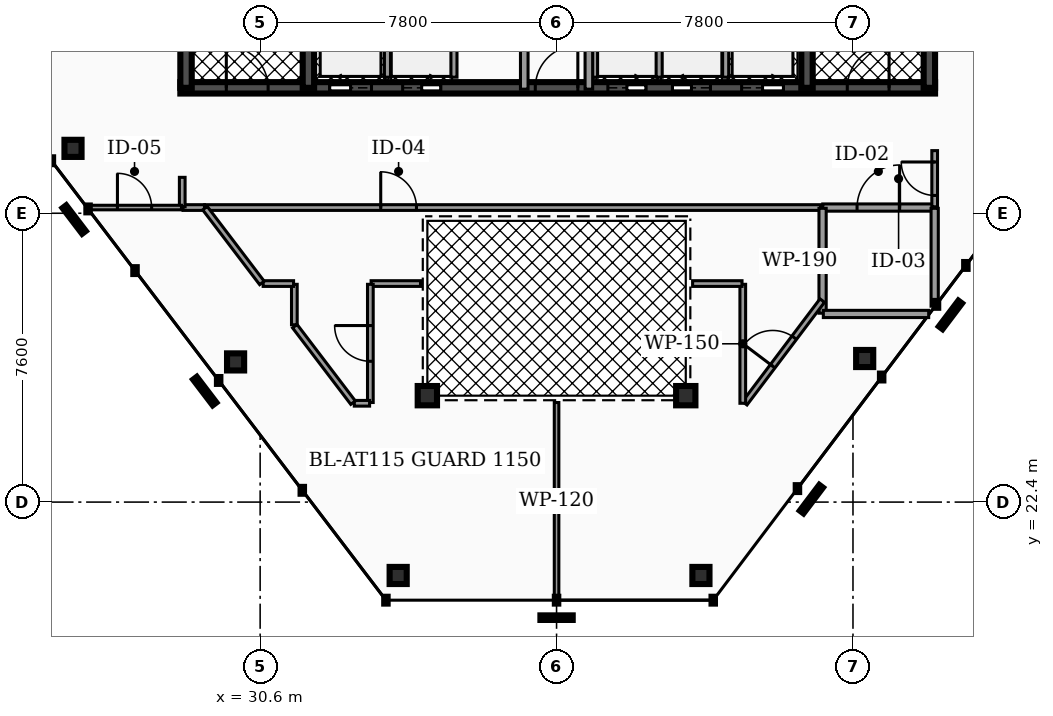
"""IFC4 building model, lengths in metres.
Left out: names, types, materials, properties, quantities, classifications, styles, units other than length and angle.
Written with IfcOpenShell. Run it as: python <this file> out.ifc"""

import sys

from ifc_helpers import new_model, si_unit, direction, frame, frame_2d, origin, origin_2d, place, context, subcontext, project, spatial, rectangle, hollow_rectangle, hollow_circle, extrude, element, fill, save


model = new_model("IFC4")
c1 = context("Model", 3, precision=1e-05, world=origin(), true_north=direction((0.0, 1.0)))
c2 = subcontext(c1, "Body", "Model", "MODEL_VIEW")
j1 = project(units=[si_unit("LENGTHUNIT", "METRE"), si_unit("PLANEANGLEUNIT", "RADIAN")], contexts=[c1])
p1 = place(None, origin())
s1 = spatial("IfcSite", under=j1, at=p1, CompositionType="ELEMENT")
p2 = place(p1, origin())
s2 = spatial("IfcBuilding", under=s1, at=p2, CompositionType="ELEMENT")
p3 = place(p2, frame((0.0, 0.0, 282.2)))
s3 = spatial("IfcBuildingStorey", under=s2, at=p3, CompositionType="ELEMENT", Elevation=282.2)
p4 = place(p3, frame((28.5, 33.3, 0.0), z_axis=(0.0, 0.0, 1.0), x_axis=(1.0, 0.0, 0.0)))
e1 = element("IfcWall", 1, at=p4, inside=s3, PredefinedType="SHEAR", context=c2, shape_type="SweptSolid", body=[
    extrude(rectangle(XDim=19.86, YDim=0.3, at=frame_2d((9.93, 0.0))), origin(), (0.0, 0.0, 1.0), 3.18),
])
p5 = place(p4, frame((3.93, 0.0, 0.0)))
e2 = element("IfcOpeningElement", 2, at=p5, cuts=e1, PredefinedType="OPENING", context=c2, shape_type="SweptSolid", body=[
    extrude(rectangle(XDim=1.1, YDim=2.15, at=frame_2d((0.55, 1.075))), frame((0.0, 0.16, 0.0), z_axis=(0.0, -1.0, 0.0), x_axis=(1.0, 0.0, 0.0)), (0.0, 0.0, 1.0), 0.32),
])
p6 = place(p4, frame((14.77, 0.0, 0.0)))
e3 = element("IfcOpeningElement", 3, at=p6, cuts=e1, PredefinedType="OPENING", context=c2, shape_type="SweptSolid", body=[
    extrude(rectangle(XDim=1.1, YDim=2.15, at=frame_2d((0.55, 1.075))), frame((0.0, 0.16, 0.0), z_axis=(0.0, -1.0, 0.0), x_axis=(1.0, 0.0, 0.0)), (0.0, 0.0, 1.0), 0.32),
])
p7 = place(p4, frame((11.25, 0.0, 0.0)))
e4 = element("IfcOpeningElement", 4, at=p7, cuts=e1, PredefinedType="OPENING", context=c2, shape_type="SweptSolid", body=[
    extrude(rectangle(XDim=1.0, YDim=2.1, at=frame_2d((0.5, 1.05))), frame((0.0, 0.16, 0.0), z_axis=(0.0, -1.0, 0.0), x_axis=(1.0, 0.0, 0.0)), (0.0, 0.0, 1.0), 0.32),
])
p8 = place(p4, frame((12.95, 0.0, 0.0)))
e5 = element("IfcOpeningElement", 5, at=p8, cuts=e1, PredefinedType="OPENING", context=c2, shape_type="SweptSolid", body=[
    extrude(rectangle(XDim=1.0, YDim=2.1, at=frame_2d((0.5, 1.05))), frame((0.0, 0.16, 0.0), z_axis=(0.0, -1.0, 0.0), x_axis=(1.0, 0.0, 0.0)), (0.0, 0.0, 1.0), 0.32),
])
p9 = place(p4, frame((5.85, 0.0, 0.0)))
e6 = element("IfcOpeningElement", 6, at=p9, cuts=e1, PredefinedType="OPENING", context=c2, shape_type="SweptSolid", body=[
    extrude(rectangle(XDim=1.0, YDim=2.1, at=frame_2d((0.5, 1.05))), frame((0.0, 0.16, 0.0), z_axis=(0.0, -1.0, 0.0), x_axis=(1.0, 0.0, 0.0)), (0.0, 0.0, 1.0), 0.32),
])
p10 = place(p4, frame((1.21, 0.0, 0.0)))
e7 = element("IfcOpeningElement", 7, at=p10, cuts=e1, PredefinedType="OPENING", context=c2, shape_type="SweptSolid", body=[
    extrude(rectangle(XDim=1.1, YDim=2.2, at=frame_2d((0.55, 1.1))), frame((0.0, 0.16, 0.0), z_axis=(0.0, -1.0, 0.0), x_axis=(1.0, 0.0, 0.0)), (0.0, 0.0, 1.0), 0.32),
])
p11 = place(p4, frame((9.34, 0.0, 0.0)))
e8 = element("IfcOpeningElement", 8, at=p11, cuts=e1, PredefinedType="OPENING", context=c2, shape_type="SweptSolid", body=[
    extrude(rectangle(XDim=1.12, YDim=2.05, at=frame_2d((0.56, 1.025))), frame((0.0, 0.16, 0.0), z_axis=(0.0, -1.0, 0.0), x_axis=(1.0, 0.0, 0.0)), (0.0, 0.0, 1.0), 0.32),
])
p12 = place(p4, frame((17.55, 0.0, 0.0)))
e9 = element("IfcOpeningElement", 9, at=p12, cuts=e1, PredefinedType="OPENING", context=c2, shape_type="SweptSolid", body=[
    extrude(rectangle(XDim=1.1, YDim=2.2, at=frame_2d((0.55, 1.1))), frame((0.0, 0.16, 0.0), z_axis=(0.0, -1.0, 0.0), x_axis=(1.0, 0.0, 0.0)), (0.0, 0.0, 1.0), 0.32),
])
for number, where, z_axis, x_axis in (
    (10, (28.65, 33.3, 0.0), (0.0, 0.0, 1.0), (0.0, 1.0, 0.0)),
    (11, (31.87, 33.3, 0.0), (0.0, 0.0, 1.0), (0.0, 1.0, 0.0)),
    (12, (44.99, 33.3, 0.0), (0.0, 0.0, 1.0), (0.0, 1.0, 0.0)),
    (13, (48.21, 33.3, 0.0), (0.0, 0.0, 1.0), (0.0, 1.0, 0.0)),
):
    element("IfcWall", number, at=place(p3, frame(where, z_axis=z_axis, x_axis=x_axis)), inside=s3, PredefinedType="SHEAR", context=c2, shape_type="SweptSolid", body=[
        extrude(rectangle(XDim=10.1, YDim=0.3, at=frame_2d((5.05, 0.0))), origin(), (0.0, 0.0, 1.0), 3.18),
    ])
for number, where, z_axis, x_axis in (
    (14, (25.676, 31.708, 0.0), (0.0, 0.0, 1.0), (1.0, 0.0, 0.0)),
    (15, (29.954, 26.088, 0.0), (0.0, 0.0, 1.0), (1.0, 0.0, 0.0)),
    (16, (34.232, 20.469, 0.0), (0.0, 0.0, 1.0), (1.0, 0.0, 0.0)),
    (17, (42.199, 20.469, 0.0), (0.0, 0.0, 1.0), (1.0, 0.0, 0.0)),
    (18, (46.508, 26.178, 0.0), (0.0, 0.0, 1.0), (1.0, 0.0, 0.0)),
):
    element("IfcColumn", number, at=place(p3, frame(where, z_axis=z_axis, x_axis=x_axis)), inside=s3, PredefinedType="COLUMN", context=c2, shape_type="SweptSolid", body=[
        extrude(hollow_rectangle(XDim=0.45, YDim=0.45, WallThickness=0.022, at=origin_2d()), origin(), (0.0, 0.0, 1.0), 3.18),
    ])
for number, where, z_axis, x_axis in (
    (19, (35.0, 25.2, 0.0), (0.0, 0.0, 1.0), (1.0, 0.0, 0.0)),
    (20, (41.8, 25.2, 0.0), (0.0, 0.0, 1.0), (1.0, 0.0, 0.0)),
):
    element("IfcColumn", number, at=place(p3, frame(where, z_axis=z_axis, x_axis=x_axis)), inside=s3, PredefinedType="COLUMN", context=c2, shape_type="SweptSolid", body=[
        extrude(hollow_circle(Radius=0.254, WallThickness=0.02, at=origin_2d()), origin(), (0.0, 0.0, 1.0), 3.18),
    ])
for number, where, z_axis, x_axis in (
    (21, (33.95, 33.58, 0.0), (0.0, 0.0, 1.0), (0.0, 1.0, 0.0)),
    (22, (42.85, 33.58, 0.0), (0.0, 0.0, 1.0), (0.0, 1.0, 0.0)),
):
    element("IfcWall", number, at=place(p3, frame(where, z_axis=z_axis, x_axis=x_axis)), inside=s3, PredefinedType="SOLIDWALL", context=c2, shape_type="SweptSolid", body=[
        extrude(rectangle(XDim=2.45, YDim=0.16, at=frame_2d((1.225, 0.0))), origin(), (0.0, 0.0, 1.0), 3.18),
    ])
for number, where, z_axis, x_axis in (
    (23, (39.4, 33.58, 0.0), (0.0, 0.0, 1.0), (0.0, 1.0, 0.0)),
    (24, (41.1, 33.58, 0.0), (0.0, 0.0, 1.0), (0.0, 1.0, 0.0)),
    (25, (35.7, 33.58, 0.0), (0.0, 0.0, 1.0), (0.0, 1.0, 0.0)),
):
    element("IfcWall", number, at=place(p3, frame(where, z_axis=z_axis, x_axis=x_axis)), inside=s3, PredefinedType="SOLIDWALL", context=c2, shape_type="SweptSolid", body=[
        extrude(rectangle(XDim=2.25, YDim=0.16, at=frame_2d((1.125, 0.0))), origin(), (0.0, 0.0, 1.0), 3.18),
    ])
p13 = place(p3, frame((37.55, 33.265, 0.0), z_axis=(0.0, 0.0, 1.0), x_axis=(0.0, 1.0, 0.0)))
e26 = element("IfcWall", 26, at=p13, inside=s3, PredefinedType="PARTITIONING", context=c2, shape_type="SweptSolid", body=[
    extrude(rectangle(XDim=4.595, YDim=0.2, at=frame_2d((2.298, 0.0))), origin(), (0.0, 0.0, 1.0), 2.235),
])
p14 = place(p13, frame((1.857, 0.0, 0.0)))
e27 = element("IfcOpeningElement", 27, at=p14, cuts=e26, PredefinedType="OPENING", context=c2, shape_type="SweptSolid", body=[
    extrude(rectangle(XDim=0.88, YDim=2.05, at=frame_2d((0.44, 1.025))), frame((0.0, 0.11, 0.0), z_axis=(0.0, -1.0, 0.0), x_axis=(1.0, 0.0, 0.0)), (0.0, 0.0, 1.0), 0.22),
])
p15 = place(p3, frame((39.25, 33.265, 0.0), z_axis=(0.0, 0.0, 1.0), x_axis=(0.0, 1.0, 0.0)))
e28 = element("IfcWall", 28, at=p15, inside=s3, PredefinedType="PARTITIONING", context=c2, shape_type="SweptSolid", body=[
    extrude(rectangle(XDim=4.595, YDim=0.2, at=frame_2d((2.298, 0.0))), origin(), (0.0, 0.0, 1.0), 2.235),
])
p16 = place(p15, frame((3.058, 0.0, 0.0)))
e29 = element("IfcOpeningElement", 29, at=p16, cuts=e28, PredefinedType="OPENING", context=c2, shape_type="SweptSolid", body=[
    extrude(rectangle(XDim=0.88, YDim=2.05, at=frame_2d((0.44, 1.025))), frame((0.0, 0.11, 0.0), z_axis=(0.0, -1.0, 0.0), x_axis=(1.0, 0.0, 0.0)), (0.0, 0.0, 1.0), 0.22),
])
p17 = place(p3, frame((45.405, 30.15, 0.0), z_axis=(0.0, 0.0, 1.0), x_axis=(1.0, 0.0, 0.0)))
e30 = element("IfcWall", 30, at=p17, inside=s3, PredefinedType="PARTITIONING", context=c2, shape_type="SweptSolid", body=[
    extrude(rectangle(XDim=2.925, YDim=0.19, at=frame_2d((1.462, 0.0))), origin(), (0.0, 0.0, 1.0), 2.235),
])
p18 = place(p17, frame((0.903, 0.0, 0.0)))
e31 = element("IfcOpeningElement", 31, at=p18, cuts=e30, PredefinedType="OPENING", context=c2, shape_type="SweptSolid", body=[
    extrude(rectangle(XDim=1.12, YDim=2.05, at=frame_2d((0.56, 1.025))), frame((0.0, 0.105, 0.0), z_axis=(0.0, -1.0, 0.0), x_axis=(1.0, 0.0, 0.0)), (0.0, 0.0, 1.0), 0.21),
])
p19 = place(p3, frame((29.141, 30.15, 0.0), z_axis=(0.0, 0.0, 1.0), x_axis=(1.0, 0.0, 0.0)))
e32 = element("IfcWall", 32, at=p19, inside=s3, PredefinedType="PARTITIONING", context=c2, shape_type="SweptSolid", body=[
    extrude(rectangle(XDim=16.204, YDim=0.15, at=frame_2d((8.102, 0.0))), origin(), (0.0, 0.0, 1.0), 2.235),
])
p20 = place(p19, frame((4.632, 0.0, 0.0)))
e33 = element("IfcOpeningElement", 33, at=p20, cuts=e32, PredefinedType="OPENING", context=c2, shape_type="SweptSolid", body=[
    extrude(rectangle(XDim=0.94, YDim=2.05, at=frame_2d((0.47, 1.025))), frame((0.0, 0.085, 0.0), z_axis=(0.0, -1.0, 0.0), x_axis=(1.0, 0.0, 0.0)), (0.0, 0.0, 1.0), 0.17),
])
p21 = place(p3, frame((28.57, 30.15, 0.0), z_axis=(0.0, 0.0, 1.0), x_axis=(1.0, 0.0, 0.0)))
e34 = element("IfcWall", 34, at=p21, inside=s3, PredefinedType="PARTITIONING", context=c2, shape_type="SweptSolid", body=[
    extrude(rectangle(XDim=0.565, YDim=0.15, at=frame_2d((0.282, 0.0))), origin(), (0.0, 0.0, 1.0), 2.235),
])
p22 = place(p3, frame((48.35, 30.17, 0.0), z_axis=(0.0, 0.0, 1.0), x_axis=(0.0, 1.0, 0.0)))
e35 = element("IfcWall", 35, at=p22, inside=s3, PredefinedType="PARTITIONING", context=c2, shape_type="SweptSolid", body=[
    extrude(rectangle(XDim=1.478, YDim=0.15, at=frame_2d((0.739, 0.0))), origin(), (0.0, 0.0, 1.0), 2.235),
])
p23 = place(p22, frame((0.299, 0.0, 0.0)))
e36 = element("IfcOpeningElement", 36, at=p23, cuts=e35, PredefinedType="OPENING", context=c2, shape_type="SweptSolid", body=[
    extrude(rectangle(XDim=0.88, YDim=2.05, at=frame_2d((0.44, 1.025))), frame((0.0, 0.085, 0.0), z_axis=(0.0, -1.0, 0.0), x_axis=(1.0, 0.0, 0.0)), (0.0, 0.0, 1.0), 0.17),
])
p24 = place(p3, frame((28.55, 30.17, 0.0), z_axis=(0.0, 0.0, 1.0), x_axis=(0.0, 1.0, 0.0)))
e37 = element("IfcWall", 37, at=p24, inside=s3, PredefinedType="PARTITIONING", context=c2, shape_type="SweptSolid", body=[
    extrude(rectangle(XDim=0.775, YDim=0.15, at=frame_2d((0.387, 0.0))), origin(), (0.0, 0.0, 1.0), 2.235),
])
p25 = place(p3, frame((45.4, 27.37, 0.0), z_axis=(0.0, 0.0, 1.0), x_axis=(0.0, 1.0, 0.0)))
e38 = element("IfcWall", 38, at=p25, inside=s3, PredefinedType="PARTITIONING", context=c2, shape_type="SweptSolid", body=[
    extrude(rectangle(XDim=2.76, YDim=0.19, at=frame_2d((1.38, 0.0))), origin(), (0.0, 0.0, 1.0), 2.235),
])
p26 = place(p3, frame((45.42, 27.35, 0.0), z_axis=(0.0, 0.0, 1.0), x_axis=(1.0, 0.0, 0.0)))
e39 = element("IfcWall", 39, at=p26, inside=s3, PredefinedType="PARTITIONING", context=c2, shape_type="SweptSolid", body=[
    extrude(rectangle(XDim=2.772, YDim=0.19, at=frame_2d((1.386, 0.0))), origin(), (0.0, 0.0, 1.0), 2.235),
])
p27 = place(p3, frame((48.35, 27.554, 0.0), z_axis=(0.0, 0.0, 1.0), x_axis=(0.0, 1.0, 0.0)))
e40 = element("IfcWall", 40, at=p27, inside=s3, PredefinedType="PARTITIONING", context=c2, shape_type="SweptSolid", body=[
    extrude(rectangle(XDim=2.575, YDim=0.19, at=frame_2d((1.288, 0.0))), origin(), (0.0, 0.0, 1.0), 2.235),
])
p28 = place(p3, frame((43.351, 25.0, 0.0), z_axis=(0.0, 0.0, 1.0), x_axis=(0.602454578258, 0.798153168969, 0.0)))
e41 = element("IfcWall", 41, at=p28, inside=s3, PredefinedType="PARTITIONING", context=c2, shape_type="SweptSolid", body=[
    extrude(rectangle(XDim=3.386, YDim=0.15, at=frame_2d((1.693, 0.0))), origin(), (0.0, 0.0, 1.0), 2.235),
])
p29 = place(p28, frame((1.223, 0.0, 0.0)))
e42 = element("IfcOpeningElement", 42, at=p29, cuts=e41, PredefinedType="OPENING", context=c2, shape_type="SweptSolid", body=[
    extrude(rectangle(XDim=0.94, YDim=2.05, at=frame_2d((0.47, 1.025))), frame((0.0, 0.085, 0.0), z_axis=(0.0, -1.0, 0.0), x_axis=(1.0, 0.0, 0.0)), (0.0, 0.0, 1.0), 0.17),
])
p30 = place(p3, frame((43.3, 25.0, 0.0), z_axis=(0.0, 0.0, 1.0), x_axis=(0.0, 1.0, 0.0)))
e43 = element("IfcWall", 43, at=p30, inside=s3, PredefinedType="PARTITIONING", context=c2, shape_type="SweptSolid", body=[
    extrude(rectangle(XDim=3.13, YDim=0.15, at=frame_2d((1.565, 0.0))), origin(), (0.0, 0.0, 1.0), 2.235),
])
for number, where, z_axis, x_axis in (
    (44, (41.98, 28.15, 0.0), (0.0, 0.0, 1.0), (1.0, 0.0, 0.0)),
    (45, (33.52, 28.15, 0.0), (0.0, 0.0, 1.0), (1.0, 0.0, 0.0)),
):
    element("IfcWall", number, at=place(p3, frame(where, z_axis=z_axis, x_axis=x_axis)), inside=s3, PredefinedType="PARTITIONING", context=c2, shape_type="SweptSolid", body=[
        extrude(rectangle(XDim=1.3, YDim=0.15, at=frame_2d((0.65, 0.0))), origin(), (0.0, 0.0, 1.0), 2.235),
    ])
p31 = place(p3, frame((33.5, 25.02, 0.0), z_axis=(0.0, 0.0, 1.0), x_axis=(0.0, 1.0, 0.0)))
e46 = element("IfcWall", 46, at=p31, inside=s3, PredefinedType="PARTITIONING", context=c2, shape_type="SweptSolid", body=[
    extrude(rectangle(XDim=3.11, YDim=0.15, at=frame_2d((1.555, 0.0))), origin(), (0.0, 0.0, 1.0), 2.235),
])
p32 = place(p31, frame((1.085, 0.0, 0.0)))
e47 = element("IfcOpeningElement", 47, at=p32, cuts=e46, PredefinedType="OPENING", context=c2, shape_type="SweptSolid", body=[
    extrude(rectangle(XDim=0.94, YDim=2.05, at=frame_2d((0.47, 1.025))), frame((0.0, 0.085, 0.0), z_axis=(0.0, -1.0, 0.0), x_axis=(1.0, 0.0, 0.0)), (0.0, 0.0, 1.0), 0.17),
])
p33 = place(p3, frame((33.077, 25.0, 0.0), z_axis=(0.0, 0.0, 1.0), x_axis=(1.0, 0.0, 0.0)))
e48 = element("IfcWall", 48, at=p33, inside=s3, PredefinedType="PARTITIONING", context=c2, shape_type="SweptSolid", body=[
    extrude(rectangle(XDim=0.403, YDim=0.15, at=frame_2d((0.201, 0.0))), origin(), (0.0, 0.0, 1.0), 2.235),
])
p34 = place(p3, frame((31.512, 27.029, 0.0), z_axis=(0.0, 0.0, 1.0), x_axis=(0.60577285366, -0.795637637225, 0.0)))
e49 = element("IfcWall", 49, at=p34, inside=s3, PredefinedType="PARTITIONING", context=c2, shape_type="SweptSolid", body=[
    extrude(rectangle(XDim=2.531, YDim=0.15, at=frame_2d((1.265, 0.0))), origin(), (0.0, 0.0, 1.0), 2.235),
])
p35 = place(p3, frame((31.5, 27.065, 0.0), z_axis=(0.0, 0.0, 1.0), x_axis=(0.0, 1.0, 0.0)))
e50 = element("IfcWall", 50, at=p35, inside=s3, PredefinedType="PARTITIONING", context=c2, shape_type="SweptSolid", body=[
    extrude(rectangle(XDim=1.065, YDim=0.15, at=frame_2d((0.532, 0.0))), origin(), (0.0, 0.0, 1.0), 2.235),
])
p36 = place(p3, frame((30.679, 28.15, 0.0), z_axis=(0.0, 0.0, 1.0), x_axis=(1.0, 0.0, 0.0)))
e51 = element("IfcWall", 51, at=p36, inside=s3, PredefinedType="PARTITIONING", context=c2, shape_type="SweptSolid", body=[
    extrude(rectangle(XDim=0.801, YDim=0.15, at=frame_2d((0.4, 0.0))), origin(), (0.0, 0.0, 1.0), 2.235),
])
p37 = place(p3, frame((29.148, 30.134, 0.0), z_axis=(0.0, 0.0, 1.0), x_axis=(0.605873710815, -0.795560837739, 0.0)))
e52 = element("IfcWall", 52, at=p37, inside=s3, PredefinedType="PARTITIONING", context=c2, shape_type="SweptSolid", body=[
    extrude(rectangle(XDim=2.474, YDim=0.15, at=frame_2d((1.237, 0.0))), origin(), (0.0, 0.0, 1.0), 2.235),
])
p38 = place(p3, frame((38.4, 19.834, 0.0), z_axis=(0.0, 0.0, 1.0), x_axis=(0.0, 1.0, 0.0)))
e53 = element("IfcWall", 53, at=p38, inside=s3, PredefinedType="PARTITIONING", context=c2, shape_type="SweptSolid", body=[
    extrude(rectangle(XDim=5.186, YDim=0.12, at=frame_2d((2.593, 0.0))), origin(), (0.0, 0.0, 1.0), 2.235),
])
p39 = place(p3, frame((26.059, 30.15, 0.0), z_axis=(0.0, 0.0, 1.0), x_axis=(1.0, 0.0, 0.0)))
e54 = element("IfcWall", 54, at=p39, inside=s3, PredefinedType="PARTITIONING", context=c2, shape_type="SweptSolid", body=[
    extrude(rectangle(XDim=2.471, YDim=0.12, at=frame_2d((1.235, 0.0))), origin(), (0.0, 0.0, 1.0), 2.235),
])
p40 = place(p39, frame((0.785, 0.0, 0.0)))
e55 = element("IfcOpeningElement", 55, at=p40, cuts=e54, PredefinedType="OPENING", context=c2, shape_type="SweptSolid", body=[
    extrude(rectangle(XDim=0.9, YDim=2.05, at=frame_2d((0.45, 1.025))), frame((0.0, 0.07, 0.0), z_axis=(0.0, -1.0, 0.0), x_axis=(1.0, 0.0, 0.0)), (0.0, 0.0, 1.0), 0.14),
])
p41 = place(p5, origin())
e56 = element("IfcDoor", 56, at=p41, inside=s3, OperationType="SLIDING_TO_LEFT", PredefinedType="DOOR", context=c2, shape_type="SweptSolid", body=[
    extrude(rectangle(XDim=1.1, YDim=2.15, at=frame_2d((0.55, 1.075))), frame((0.0, 0.025, 0.0), z_axis=(0.0, -1.0, 0.0), x_axis=(1.0, 0.0, 0.0)), (0.0, 0.0, 1.0), 0.05),
])
fill(e2, e56)
p42 = place(p6, origin())
e57 = element("IfcDoor", 57, at=p42, inside=s3, OperationType="SLIDING_TO_RIGHT", PredefinedType="DOOR", context=c2, shape_type="SweptSolid", body=[
    extrude(rectangle(XDim=1.1, YDim=2.15, at=frame_2d((0.55, 1.075))), frame((0.0, 0.025, 0.0), z_axis=(0.0, -1.0, 0.0), x_axis=(1.0, 0.0, 0.0)), (0.0, 0.0, 1.0), 0.05),
])
fill(e3, e57)
p43 = place(p7, origin())
e58 = element("IfcDoor", 58, at=p43, inside=s3, OperationType="SLIDING_TO_RIGHT", PredefinedType="DOOR", context=c2, shape_type="SweptSolid", body=[
    extrude(rectangle(XDim=1.0, YDim=2.1, at=frame_2d((0.5, 1.05))), frame((0.0, 0.025, 0.0), z_axis=(0.0, -1.0, 0.0), x_axis=(1.0, 0.0, 0.0)), (0.0, 0.0, 1.0), 0.05),
])
fill(e4, e58)
p44 = place(p8, origin())
e59 = element("IfcDoor", 59, at=p44, inside=s3, OperationType="SLIDING_TO_LEFT", PredefinedType="DOOR", context=c2, shape_type="SweptSolid", body=[
    extrude(rectangle(XDim=1.0, YDim=2.1, at=frame_2d((0.5, 1.05))), frame((0.0, 0.025, 0.0), z_axis=(0.0, -1.0, 0.0), x_axis=(1.0, 0.0, 0.0)), (0.0, 0.0, 1.0), 0.05),
])
fill(e5, e59)
p45 = place(p9, origin())
e60 = element("IfcDoor", 60, at=p45, inside=s3, OperationType="SLIDING_TO_RIGHT", PredefinedType="DOOR", context=c2, shape_type="SweptSolid", body=[
    extrude(rectangle(XDim=1.0, YDim=2.1, at=frame_2d((0.5, 1.05))), frame((0.0, 0.025, 0.0), z_axis=(0.0, -1.0, 0.0), x_axis=(1.0, 0.0, 0.0)), (0.0, 0.0, 1.0), 0.05),
])
fill(e6, e60)
p46 = place(p10, origin())
e61 = element("IfcDoor", 61, at=p46, inside=s3, OperationType="SINGLE_SWING_LEFT", PredefinedType="DOOR", context=c2, shape_type="SweptSolid", body=[
    extrude(rectangle(XDim=1.1, YDim=2.2, at=frame_2d((0.55, 1.1))), frame((0.0, 0.025, 0.0), z_axis=(0.0, -1.0, 0.0), x_axis=(1.0, 0.0, 0.0)), (0.0, 0.0, 1.0), 0.05),
])
fill(e7, e61)
p47 = place(p11, origin())
e62 = element("IfcDoor", 62, at=p47, inside=s3, OperationType="SINGLE_SWING_RIGHT", PredefinedType="DOOR", context=c2, shape_type="SweptSolid", body=[
    extrude(rectangle(XDim=1.12, YDim=2.05, at=frame_2d((0.56, 1.025))), frame((0.0, 0.025, 0.0), z_axis=(0.0, -1.0, 0.0), x_axis=(1.0, 0.0, 0.0)), (0.0, 0.0, 1.0), 0.05),
])
fill(e8, e62)
p48 = place(p12, origin())
e63 = element("IfcDoor", 63, at=p48, inside=s3, OperationType="SINGLE_SWING_RIGHT", PredefinedType="DOOR", context=c2, shape_type="SweptSolid", body=[
    extrude(rectangle(XDim=1.1, YDim=2.2, at=frame_2d((0.55, 1.1))), frame((0.0, 0.025, 0.0), z_axis=(0.0, -1.0, 0.0), x_axis=(1.0, 0.0, 0.0)), (0.0, 0.0, 1.0), 0.05),
])
fill(e9, e63)
p49 = place(p18, origin())
e64 = element("IfcDoor", 64, at=p49, inside=s3, OperationType="SINGLE_SWING_RIGHT", PredefinedType="DOOR", context=c2, shape_type="SweptSolid", body=[
    extrude(rectangle(XDim=1.12, YDim=2.05, at=frame_2d((0.56, 1.025))), frame((0.0, 0.025, 0.0), z_axis=(0.0, -1.0, 0.0), x_axis=(1.0, 0.0, 0.0)), (0.0, 0.0, 1.0), 0.05),
])
fill(e31, e64)
p50 = place(p20, origin())
e65 = element("IfcDoor", 65, at=p50, inside=s3, OperationType="SINGLE_SWING_LEFT", PredefinedType="DOOR", context=c2, shape_type="SweptSolid", body=[
    extrude(rectangle(XDim=0.94, YDim=2.05, at=frame_2d((0.47, 1.025))), frame((0.0, 0.025, 0.0), z_axis=(0.0, -1.0, 0.0), x_axis=(1.0, 0.0, 0.0)), (0.0, 0.0, 1.0), 0.05),
])
fill(e33, e65)
p51 = place(p23, origin())
e66 = element("IfcDoor", 66, at=p51, inside=s3, OperationType="SINGLE_SWING_RIGHT", PredefinedType="DOOR", context=c2, shape_type="SweptSolid", body=[
    extrude(rectangle(XDim=0.88, YDim=2.05, at=frame_2d((0.44, 1.025))), frame((0.0, 0.025, 0.0), z_axis=(0.0, -1.0, 0.0), x_axis=(1.0, 0.0, 0.0)), (0.0, 0.0, 1.0), 0.05),
])
fill(e36, e66)
p52 = place(p29, origin())
e67 = element("IfcDoor", 67, at=p52, inside=s3, OperationType="SINGLE_SWING_LEFT", PredefinedType="DOOR", context=c2, shape_type="SweptSolid", body=[
    extrude(rectangle(XDim=0.94, YDim=2.05, at=frame_2d((0.47, 1.025))), frame((0.0, 0.025, 0.0), z_axis=(0.0, -1.0, 0.0), x_axis=(1.0, 0.0, 0.0)), (0.0, 0.0, 1.0), 0.05),
])
fill(e42, e67)
p53 = place(p32, origin())
e68 = element("IfcDoor", 68, at=p53, inside=s3, OperationType="SINGLE_SWING_RIGHT", PredefinedType="DOOR", context=c2, shape_type="SweptSolid", body=[
    extrude(rectangle(XDim=0.94, YDim=2.05, at=frame_2d((0.47, 1.025))), frame((0.0, 0.025, 0.0), z_axis=(0.0, -1.0, 0.0), x_axis=(1.0, 0.0, 0.0)), (0.0, 0.0, 1.0), 0.05),
])
fill(e47, e68)
p54 = place(p40, origin())
e69 = element("IfcDoor", 69, at=p54, inside=s3, OperationType="SINGLE_SWING_LEFT", PredefinedType="DOOR", context=c2, shape_type="SweptSolid", body=[
    extrude(rectangle(XDim=0.9, YDim=2.05, at=frame_2d((0.45, 1.025))), frame((0.0, 0.025, 0.0), z_axis=(0.0, -1.0, 0.0), x_axis=(1.0, 0.0, 0.0)), (0.0, 0.0, 1.0), 0.05),
])
fill(e55, e69)
save(model, sys.argv[1])
